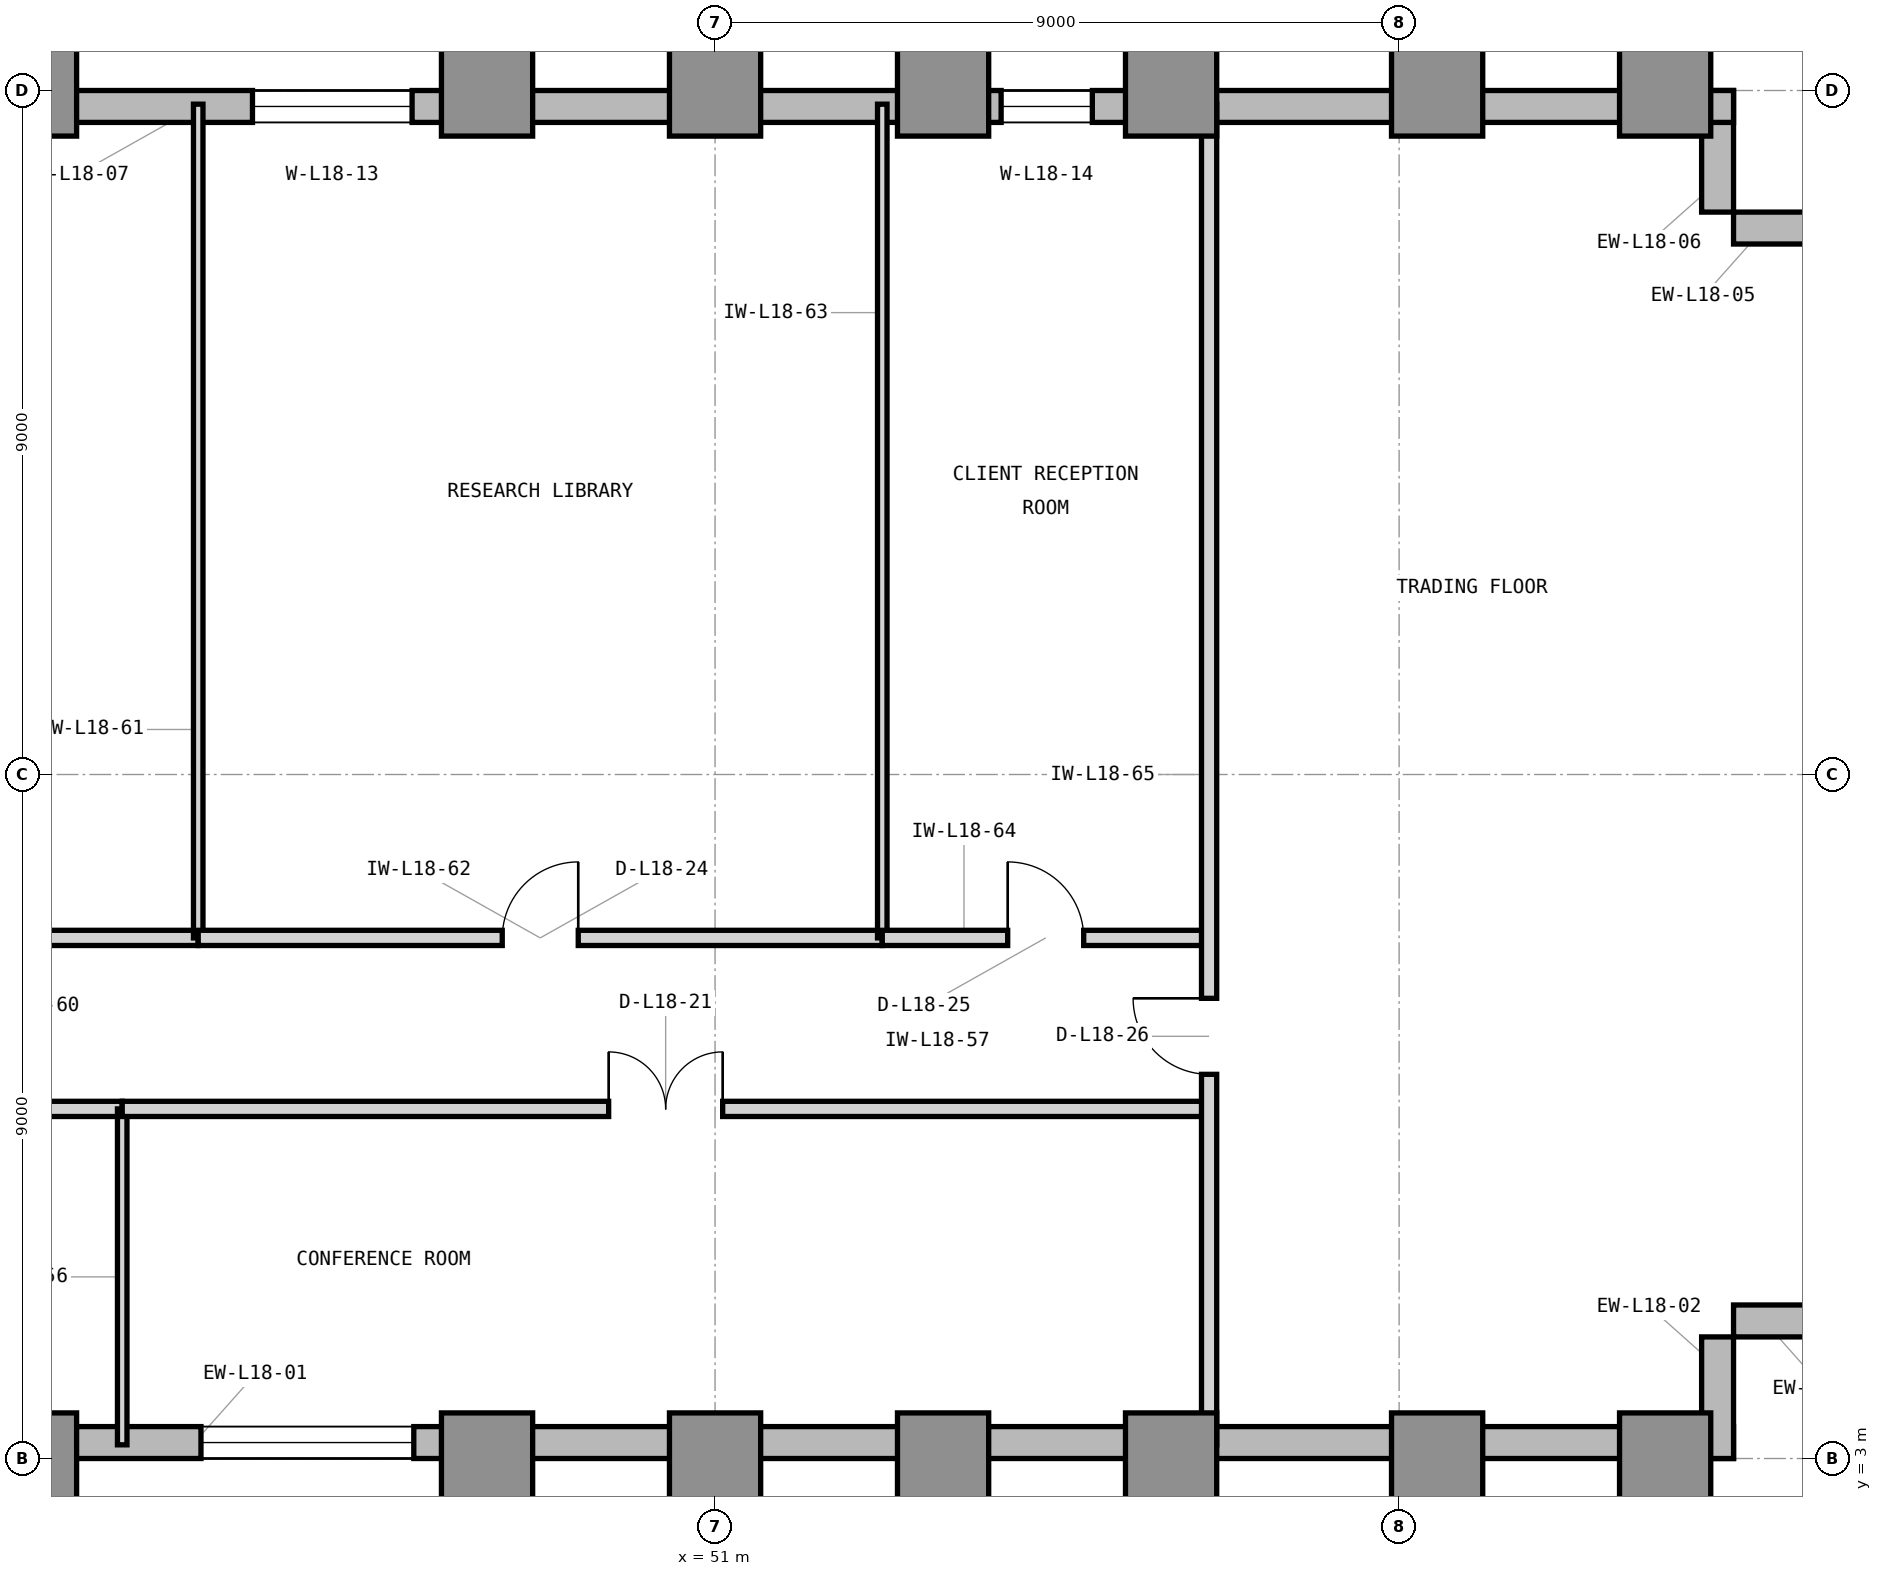
"""IFC4 building model, lengths in metres.
Left out: names, types, materials, properties, quantities, classifications, styles, units other than length and angle.
Written with IfcOpenShell. Run it as: python <this file> out.ifc"""

import sys

from ifc_helpers import new_model, si_unit, direction, frame, frame_2d, origin, origin_2d, place, context, subcontext, project, spatial, rectangle, extrude, element, fill, save


model = new_model("IFC4")
c1 = context("Model", 3, precision=1e-05, world=origin(), true_north=direction((0.0, 1.0)))
c2 = subcontext(c1, "Body", "Model", "MODEL_VIEW")
j1 = project(units=[si_unit("LENGTHUNIT", "METRE"), si_unit("PLANEANGLEUNIT", "RADIAN")], contexts=[c1])
p1 = place(None, origin())
s1 = spatial("IfcSite", under=j1, at=p1, CompositionType="ELEMENT")
p2 = place(p1, origin())
s2 = spatial("IfcBuilding", under=s1, at=p2, CompositionType="ELEMENT")
p3 = place(p2, frame((0.0, 0.0, 80.4)))
s3 = spatial("IfcBuildingStorey", under=s2, at=p3, CompositionType="ELEMENT", Elevation=80.4)
for number, where, z_axis, x_axis in (
    (1, (42.0, 3.0, 0.0), (0.0, 0.0, 1.0), (1.0, 0.0, 0.0)),
    (2, (42.0, 21.0, 0.0), (0.0, 0.0, 1.0), (1.0, 0.0, 0.0)),
    (3, (48.0, 3.0, 0.0), (0.0, 0.0, 1.0), (1.0, 0.0, 0.0)),
    (4, (48.0, 21.0, 0.0), (0.0, 0.0, 1.0), (1.0, 0.0, 0.0)),
    (5, (51.0, 3.0, 0.0), (0.0, 0.0, 1.0), (1.0, 0.0, 0.0)),
    (6, (51.0, 21.0, 0.0), (0.0, 0.0, 1.0), (1.0, 0.0, 0.0)),
    (7, (54.0, 3.0, 0.0), (0.0, 0.0, 1.0), (1.0, 0.0, 0.0)),
    (8, (54.0, 21.0, 0.0), (0.0, 0.0, 1.0), (1.0, 0.0, 0.0)),
    (9, (57.0, 3.0, 0.0), (0.0, 0.0, 1.0), (1.0, 0.0, 0.0)),
    (10, (57.0, 21.0, 0.0), (0.0, 0.0, 1.0), (1.0, 0.0, 0.0)),
    (11, (60.5, 3.0, 0.0), (0.0, 0.0, 1.0), (1.0, 0.0, 0.0)),
    (12, (60.5, 21.0, 0.0), (0.0, 0.0, 1.0), (1.0, 0.0, 0.0)),
    (13, (63.5, 3.0, 0.0), (0.0, 0.0, 1.0), (1.0, 0.0, 0.0)),
    (14, (63.5, 21.0, 0.0), (0.0, 0.0, 1.0), (1.0, 0.0, 0.0)),
):
    element("IfcColumn", number, at=place(p3, frame(where, z_axis=z_axis, x_axis=x_axis)), inside=s3, PredefinedType="COLUMN", context=c2, shape_type="SweptSolid", body=[
        extrude(rectangle(XDim=1.2, YDim=1.2, at=origin_2d()), origin(), (0.0, 0.0, 1.0), 4.2),
    ])
p4 = place(p3, frame((23.9, 3.21, 0.0), z_axis=(0.0, 0.0, 1.0), x_axis=(1.0, 0.0, 0.0)))
e15 = element("IfcWall", 15, at=p4, inside=s3, PredefinedType="STANDARD", context=c2, shape_type="SweptSolid", body=[
    extrude(rectangle(XDim=40.5, YDim=0.42, at=frame_2d((20.25, 0.0))), origin(), (0.0, 0.0, 1.0), 3.92),
])
p5 = place(p4, frame((1.1, 0.0, 0.85)))
e16 = element("IfcOpeningElement", 16, at=p5, cuts=e15, PredefinedType="OPENING", context=c2, shape_type="SweptSolid", body=[
    extrude(rectangle(XDim=1.2, YDim=2.45, at=frame_2d((0.6, 1.225))), frame((0.0, 0.22, 0.0), z_axis=(0.0, -1.0, 0.0), x_axis=(1.0, 0.0, 0.0)), (0.0, 0.0, 1.0), 0.44),
])
p6 = place(p4, frame((5.336, 0.0, 0.85)))
e17 = element("IfcOpeningElement", 17, at=p6, cuts=e15, PredefinedType="OPENING", context=c2, shape_type="SweptSolid", body=[
    extrude(rectangle(XDim=2.8, YDim=2.45, at=frame_2d((1.4, 1.225))), frame((0.0, 0.22, 0.0), z_axis=(0.0, -1.0, 0.0), x_axis=(1.0, 0.0, 0.0)), (0.0, 0.0, 1.0), 0.44),
])
p7 = place(p4, frame((14.136, 0.0, 0.85)))
e18 = element("IfcOpeningElement", 18, at=p7, cuts=e15, PredefinedType="OPENING", context=c2, shape_type="SweptSolid", body=[
    extrude(rectangle(XDim=2.8, YDim=2.45, at=frame_2d((1.4, 1.225))), frame((0.0, 0.22, 0.0), z_axis=(0.0, -1.0, 0.0), x_axis=(1.0, 0.0, 0.0)), (0.0, 0.0, 1.0), 0.44),
])
p8 = place(p4, frame((20.336, 0.0, 0.85)))
e19 = element("IfcOpeningElement", 19, at=p8, cuts=e15, PredefinedType="OPENING", context=c2, shape_type="SweptSolid", body=[
    extrude(rectangle(XDim=2.8, YDim=2.45, at=frame_2d((1.4, 1.225))), frame((0.0, 0.22, 0.0), z_axis=(0.0, -1.0, 0.0), x_axis=(1.0, 0.0, 0.0)), (0.0, 0.0, 1.0), 0.44),
])
for number, where, z_axis, x_axis in (
    (20, (64.19, 3.0, 0.0), (0.0, 0.0, 1.0), (0.0, 1.0, 0.0)),
    (21, (64.4, 4.81, 0.0), (0.0, 0.0, 1.0), (1.0, 0.0, 0.0)),
    (22, (66.0, 19.19, 0.0), (0.0, 0.0, 1.0), (-1.0, 0.0, 0.0)),
    (23, (64.19, 19.4, 0.0), (0.0, 0.0, 1.0), (0.0, 1.0, 0.0)),
):
    element("IfcWall", number, at=place(p3, frame(where, z_axis=z_axis, x_axis=x_axis)), inside=s3, PredefinedType="STANDARD", context=c2, shape_type="SweptSolid", body=[
        extrude(rectangle(XDim=1.6, YDim=0.42, at=frame_2d((0.8, 0.0))), origin(), (0.0, 0.0, 1.0), 3.92),
    ])
p9 = place(p3, frame((64.4, 20.79, 0.0), z_axis=(0.0, 0.0, 1.0), x_axis=(-1.0, 0.0, 0.0)))
e24 = element("IfcWall", 24, at=p9, inside=s3, PredefinedType="STANDARD", context=c2, shape_type="SweptSolid", body=[
    extrude(rectangle(XDim=40.4, YDim=0.42, at=frame_2d((20.2, 0.0))), origin(), (0.0, 0.0, 1.0), 3.92),
])
p10 = place(p9, frame((38.222, 0.0, 0.85)))
e25 = element("IfcOpeningElement", 25, at=p10, cuts=e24, PredefinedType="OPENING", context=c2, shape_type="SweptSolid", body=[
    extrude(rectangle(XDim=1.2, YDim=2.45, at=frame_2d((0.6, 1.225))), frame((0.0, 0.22, 0.0), z_axis=(0.0, -1.0, 0.0), x_axis=(1.0, 0.0, 0.0)), (0.0, 0.0, 1.0), 0.44),
])
p11 = place(p9, frame((32.386, 0.0, 0.85)))
e26 = element("IfcOpeningElement", 26, at=p11, cuts=e24, PredefinedType="OPENING", context=c2, shape_type="SweptSolid", body=[
    extrude(rectangle(XDim=2.8, YDim=2.45, at=frame_2d((1.4, 1.225))), frame((0.0, 0.22, 0.0), z_axis=(0.0, -1.0, 0.0), x_axis=(1.0, 0.0, 0.0)), (0.0, 0.0, 1.0), 0.44),
])
p12 = place(p9, frame((23.386, 0.0, 0.85)))
e27 = element("IfcOpeningElement", 27, at=p12, cuts=e24, PredefinedType="OPENING", context=c2, shape_type="SweptSolid", body=[
    extrude(rectangle(XDim=2.8, YDim=2.45, at=frame_2d((1.4, 1.225))), frame((0.0, 0.22, 0.0), z_axis=(0.0, -1.0, 0.0), x_axis=(1.0, 0.0, 0.0)), (0.0, 0.0, 1.0), 0.44),
])
p13 = place(p9, frame((17.386, 0.0, 0.85)))
e28 = element("IfcOpeningElement", 28, at=p13, cuts=e24, PredefinedType="OPENING", context=c2, shape_type="SweptSolid", body=[
    extrude(rectangle(XDim=2.1, YDim=2.45, at=frame_2d((1.05, 1.225))), frame((0.0, 0.22, 0.0), z_axis=(0.0, -1.0, 0.0), x_axis=(1.0, 0.0, 0.0)), (0.0, 0.0, 1.0), 0.44),
])
p14 = place(p9, frame((8.436, 0.0, 0.85)))
e29 = element("IfcOpeningElement", 29, at=p14, cuts=e24, PredefinedType="OPENING", context=c2, shape_type="SweptSolid", body=[
    extrude(rectangle(XDim=1.2, YDim=2.45, at=frame_2d((0.6, 1.225))), frame((0.0, 0.22, 0.0), z_axis=(0.0, -1.0, 0.0), x_axis=(1.0, 0.0, 0.0)), (0.0, 0.0, 1.0), 0.44),
])
p15 = place(p3, frame((35.7, 7.6, 0.0), z_axis=(0.0, 0.0, 1.0), x_axis=(1.0, 0.0, 0.0)))
e30 = element("IfcWall", 30, at=p15, inside=s3, PredefinedType="PARTITIONING", context=c2, shape_type="SweptSolid", body=[
    extrude(rectangle(XDim=7.5, YDim=0.2, at=frame_2d((3.75, 0.0))), origin(), (0.0, 0.0, 1.0), 3.91),
])
p16 = place(p15, frame((3.25, 0.0, 0.0)))
e31 = element("IfcOpeningElement", 31, at=p16, cuts=e30, PredefinedType="OPENING", context=c2, shape_type="SweptSolid", body=[
    extrude(rectangle(XDim=1.0, YDim=2.15, at=frame_2d((0.5, 1.075))), frame((0.0, 0.11, 0.0), z_axis=(0.0, -1.0, 0.0), x_axis=(1.0, 0.0, 0.0)), (0.0, 0.0, 1.0), 0.22),
])
p17 = place(p3, frame((43.2, 3.18, 0.0), z_axis=(0.0, 0.0, 1.0), x_axis=(0.0, 1.0, 0.0)))
e32 = element("IfcWall", 32, at=p17, inside=s3, PredefinedType="PARTITIONING", context=c2, shape_type="SweptSolid", body=[
    extrude(rectangle(XDim=4.42, YDim=0.125, at=frame_2d((2.21, 0.0))), origin(), (0.0, 0.0, 1.0), 3.91),
])
p18 = place(p3, frame((43.2, 7.6, 0.0), z_axis=(0.0, 0.0, 1.0), x_axis=(1.0, 0.0, 0.0)))
e33 = element("IfcWall", 33, at=p18, inside=s3, PredefinedType="PARTITIONING", context=c2, shape_type="SweptSolid", body=[
    extrude(rectangle(XDim=14.3, YDim=0.2, at=frame_2d((7.15, 0.0))), origin(), (0.0, 0.0, 1.0), 3.91),
])
p19 = place(p18, frame((6.4, 0.0, 0.0)))
e34 = element("IfcOpeningElement", 34, at=p19, cuts=e33, PredefinedType="OPENING", context=c2, shape_type="SweptSolid", body=[
    extrude(rectangle(XDim=1.5, YDim=2.3, at=frame_2d((0.75, 1.15))), frame((0.0, 0.11, 0.0), z_axis=(0.0, -1.0, 0.0), x_axis=(1.0, 0.0, 0.0)), (0.0, 0.0, 1.0), 0.22),
])
p20 = place(p3, frame((35.2, 9.85, 0.0), z_axis=(0.0, 0.0, 1.0), x_axis=(1.0, 0.0, 0.0)))
e35 = element("IfcWall", 35, at=p20, inside=s3, PredefinedType="PARTITIONING", context=c2, shape_type="SweptSolid", body=[
    extrude(rectangle(XDim=9.0, YDim=0.2, at=frame_2d((4.5, 0.0))), origin(), (0.0, 0.0, 1.0), 3.91),
])
p21 = place(p20, frame((4.0, 0.0, 0.0)))
e36 = element("IfcOpeningElement", 36, at=p21, cuts=e35, PredefinedType="OPENING", context=c2, shape_type="SweptSolid", body=[
    extrude(rectangle(XDim=1.0, YDim=2.15, at=frame_2d((0.5, 1.075))), frame((0.0, 0.11, 0.0), z_axis=(0.0, -1.0, 0.0), x_axis=(1.0, 0.0, 0.0)), (0.0, 0.0, 1.0), 0.22),
])
p22 = place(p3, frame((44.2, 9.85, 0.0), z_axis=(0.0, 0.0, 1.0), x_axis=(0.0, 1.0, 0.0)))
e37 = element("IfcWall", 37, at=p22, inside=s3, PredefinedType="PARTITIONING", context=c2, shape_type="SweptSolid", body=[
    extrude(rectangle(XDim=10.97, YDim=0.125, at=frame_2d((5.485, 0.0))), origin(), (0.0, 0.0, 1.0), 3.91),
])
p23 = place(p3, frame((44.2, 9.85, 0.0), z_axis=(0.0, 0.0, 1.0), x_axis=(1.0, 0.0, 0.0)))
e38 = element("IfcWall", 38, at=p23, inside=s3, PredefinedType="PARTITIONING", context=c2, shape_type="SweptSolid", body=[
    extrude(rectangle(XDim=9.0, YDim=0.2, at=frame_2d((4.5, 0.0))), origin(), (0.0, 0.0, 1.0), 3.91),
])
p24 = place(p23, frame((4.0, 0.0, 0.0)))
e39 = element("IfcOpeningElement", 39, at=p24, cuts=e38, PredefinedType="OPENING", context=c2, shape_type="SweptSolid", body=[
    extrude(rectangle(XDim=1.0, YDim=2.15, at=frame_2d((0.5, 1.075))), frame((0.0, 0.11, 0.0), z_axis=(0.0, -1.0, 0.0), x_axis=(1.0, 0.0, 0.0)), (0.0, 0.0, 1.0), 0.22),
])
p25 = place(p3, frame((53.2, 9.85, 0.0), z_axis=(0.0, 0.0, 1.0), x_axis=(0.0, 1.0, 0.0)))
e40 = element("IfcWall", 40, at=p25, inside=s3, PredefinedType="PARTITIONING", context=c2, shape_type="SweptSolid", body=[
    extrude(rectangle(XDim=10.97, YDim=0.125, at=frame_2d((5.485, 0.0))), origin(), (0.0, 0.0, 1.0), 3.91),
])
p26 = place(p3, frame((53.2, 9.85, 0.0), z_axis=(0.0, 0.0, 1.0), x_axis=(1.0, 0.0, 0.0)))
e41 = element("IfcWall", 41, at=p26, inside=s3, PredefinedType="PARTITIONING", context=c2, shape_type="SweptSolid", body=[
    extrude(rectangle(XDim=4.3, YDim=0.2, at=frame_2d((2.15, 0.0))), origin(), (0.0, 0.0, 1.0), 3.91),
])
p27 = place(p26, frame((1.65, 0.0, 0.0)))
e42 = element("IfcOpeningElement", 42, at=p27, cuts=e41, PredefinedType="OPENING", context=c2, shape_type="SweptSolid", body=[
    extrude(rectangle(XDim=1.0, YDim=2.15, at=frame_2d((0.5, 1.075))), frame((0.0, 0.11, 0.0), z_axis=(0.0, -1.0, 0.0), x_axis=(1.0, 0.0, 0.0)), (0.0, 0.0, 1.0), 0.22),
])
p28 = place(p3, frame((57.5, 3.18, 0.0), z_axis=(0.0, 0.0, 1.0), x_axis=(0.0, 1.0, 0.0)))
e43 = element("IfcWall", 43, at=p28, inside=s3, PredefinedType="PARTITIONING", context=c2, shape_type="SweptSolid", body=[
    extrude(rectangle(XDim=17.64, YDim=0.2, at=frame_2d((8.82, 0.0))), origin(), (0.0, 0.0, 1.0), 3.91),
])
p29 = place(p28, frame((4.875, 0.0, 0.0)))
e44 = element("IfcOpeningElement", 44, at=p29, cuts=e43, PredefinedType="OPENING", context=c2, shape_type="SweptSolid", body=[
    extrude(rectangle(XDim=1.0, YDim=2.15, at=frame_2d((0.5, 1.075))), frame((0.0, 0.11, 0.0), z_axis=(0.0, -1.0, 0.0), x_axis=(1.0, 0.0, 0.0)), (0.0, 0.0, 1.0), 0.22),
])
p30 = place(p19, origin())
e45 = element("IfcDoor", 45, at=p30, inside=s3, OperationType="DOUBLE_DOOR_SINGLE_SWING", PredefinedType="DOOR", context=c2, shape_type="SweptSolid", body=[
    extrude(rectangle(XDim=1.5, YDim=2.3, at=frame_2d((0.75, 1.15))), frame((0.0, 0.025, 0.0), z_axis=(0.0, -1.0, 0.0), x_axis=(1.0, 0.0, 0.0)), (0.0, 0.0, 1.0), 0.05),
])
fill(e34, e45)
p31 = place(p24, origin())
e46 = element("IfcDoor", 46, at=p31, inside=s3, OperationType="SINGLE_SWING_RIGHT", PredefinedType="DOOR", context=c2, shape_type="SweptSolid", body=[
    extrude(rectangle(XDim=1.0, YDim=2.15, at=frame_2d((0.5, 1.075))), frame((0.0, 0.025, 0.0), z_axis=(0.0, -1.0, 0.0), x_axis=(1.0, 0.0, 0.0)), (0.0, 0.0, 1.0), 0.05),
])
fill(e39, e46)
p32 = place(p27, origin())
e47 = element("IfcDoor", 47, at=p32, inside=s3, OperationType="SINGLE_SWING_LEFT", PredefinedType="DOOR", context=c2, shape_type="SweptSolid", body=[
    extrude(rectangle(XDim=1.0, YDim=2.15, at=frame_2d((0.5, 1.075))), frame((0.0, 0.025, 0.0), z_axis=(0.0, -1.0, 0.0), x_axis=(1.0, 0.0, 0.0)), (0.0, 0.0, 1.0), 0.05),
])
fill(e42, e47)
p33 = place(p29, origin())
e48 = element("IfcDoor", 48, at=p33, inside=s3, OperationType="SINGLE_SWING_RIGHT", PredefinedType="DOOR", context=c2, shape_type="SweptSolid", body=[
    extrude(rectangle(XDim=1.0, YDim=2.15, at=frame_2d((0.5, 1.075))), frame((0.0, 0.025, 0.0), z_axis=(0.0, -1.0, 0.0), x_axis=(1.0, 0.0, 0.0)), (0.0, 0.0, 1.0), 0.05),
])
fill(e44, e48)
p34 = place(p8, origin())
e49 = element("IfcWindow", 49, at=p34, inside=s3, PartitioningType="SINGLE_PANEL", PredefinedType="WINDOW", context=c2, shape_type="SweptSolid", body=[
    extrude(rectangle(XDim=2.8, YDim=2.45, at=frame_2d((1.4, 1.225))), frame((0.0, 0.11, 0.0), z_axis=(0.0, -1.0, 0.0), x_axis=(1.0, 0.0, 0.0)), (0.0, 0.0, 1.0), 0.06),
])
fill(e19, e49)
p35 = place(p13, origin())
e50 = element("IfcWindow", 50, at=p35, inside=s3, PartitioningType="SINGLE_PANEL", PredefinedType="WINDOW", context=c2, shape_type="SweptSolid", body=[
    extrude(rectangle(XDim=2.1, YDim=2.45, at=frame_2d((1.05, 1.225))), frame((0.0, 0.11, 0.0), z_axis=(0.0, -1.0, 0.0), x_axis=(1.0, 0.0, 0.0)), (0.0, 0.0, 1.0), 0.06),
])
fill(e28, e50)
p36 = place(p14, origin())
e51 = element("IfcWindow", 51, at=p36, inside=s3, PartitioningType="SINGLE_PANEL", PredefinedType="WINDOW", context=c2, shape_type="SweptSolid", body=[
    extrude(rectangle(XDim=1.2, YDim=2.45, at=frame_2d((0.6, 1.225))), frame((0.0, 0.11, 0.0), z_axis=(0.0, -1.0, 0.0), x_axis=(1.0, 0.0, 0.0)), (0.0, 0.0, 1.0), 0.06),
])
fill(e29, e51)
save(model, sys.argv[1])
